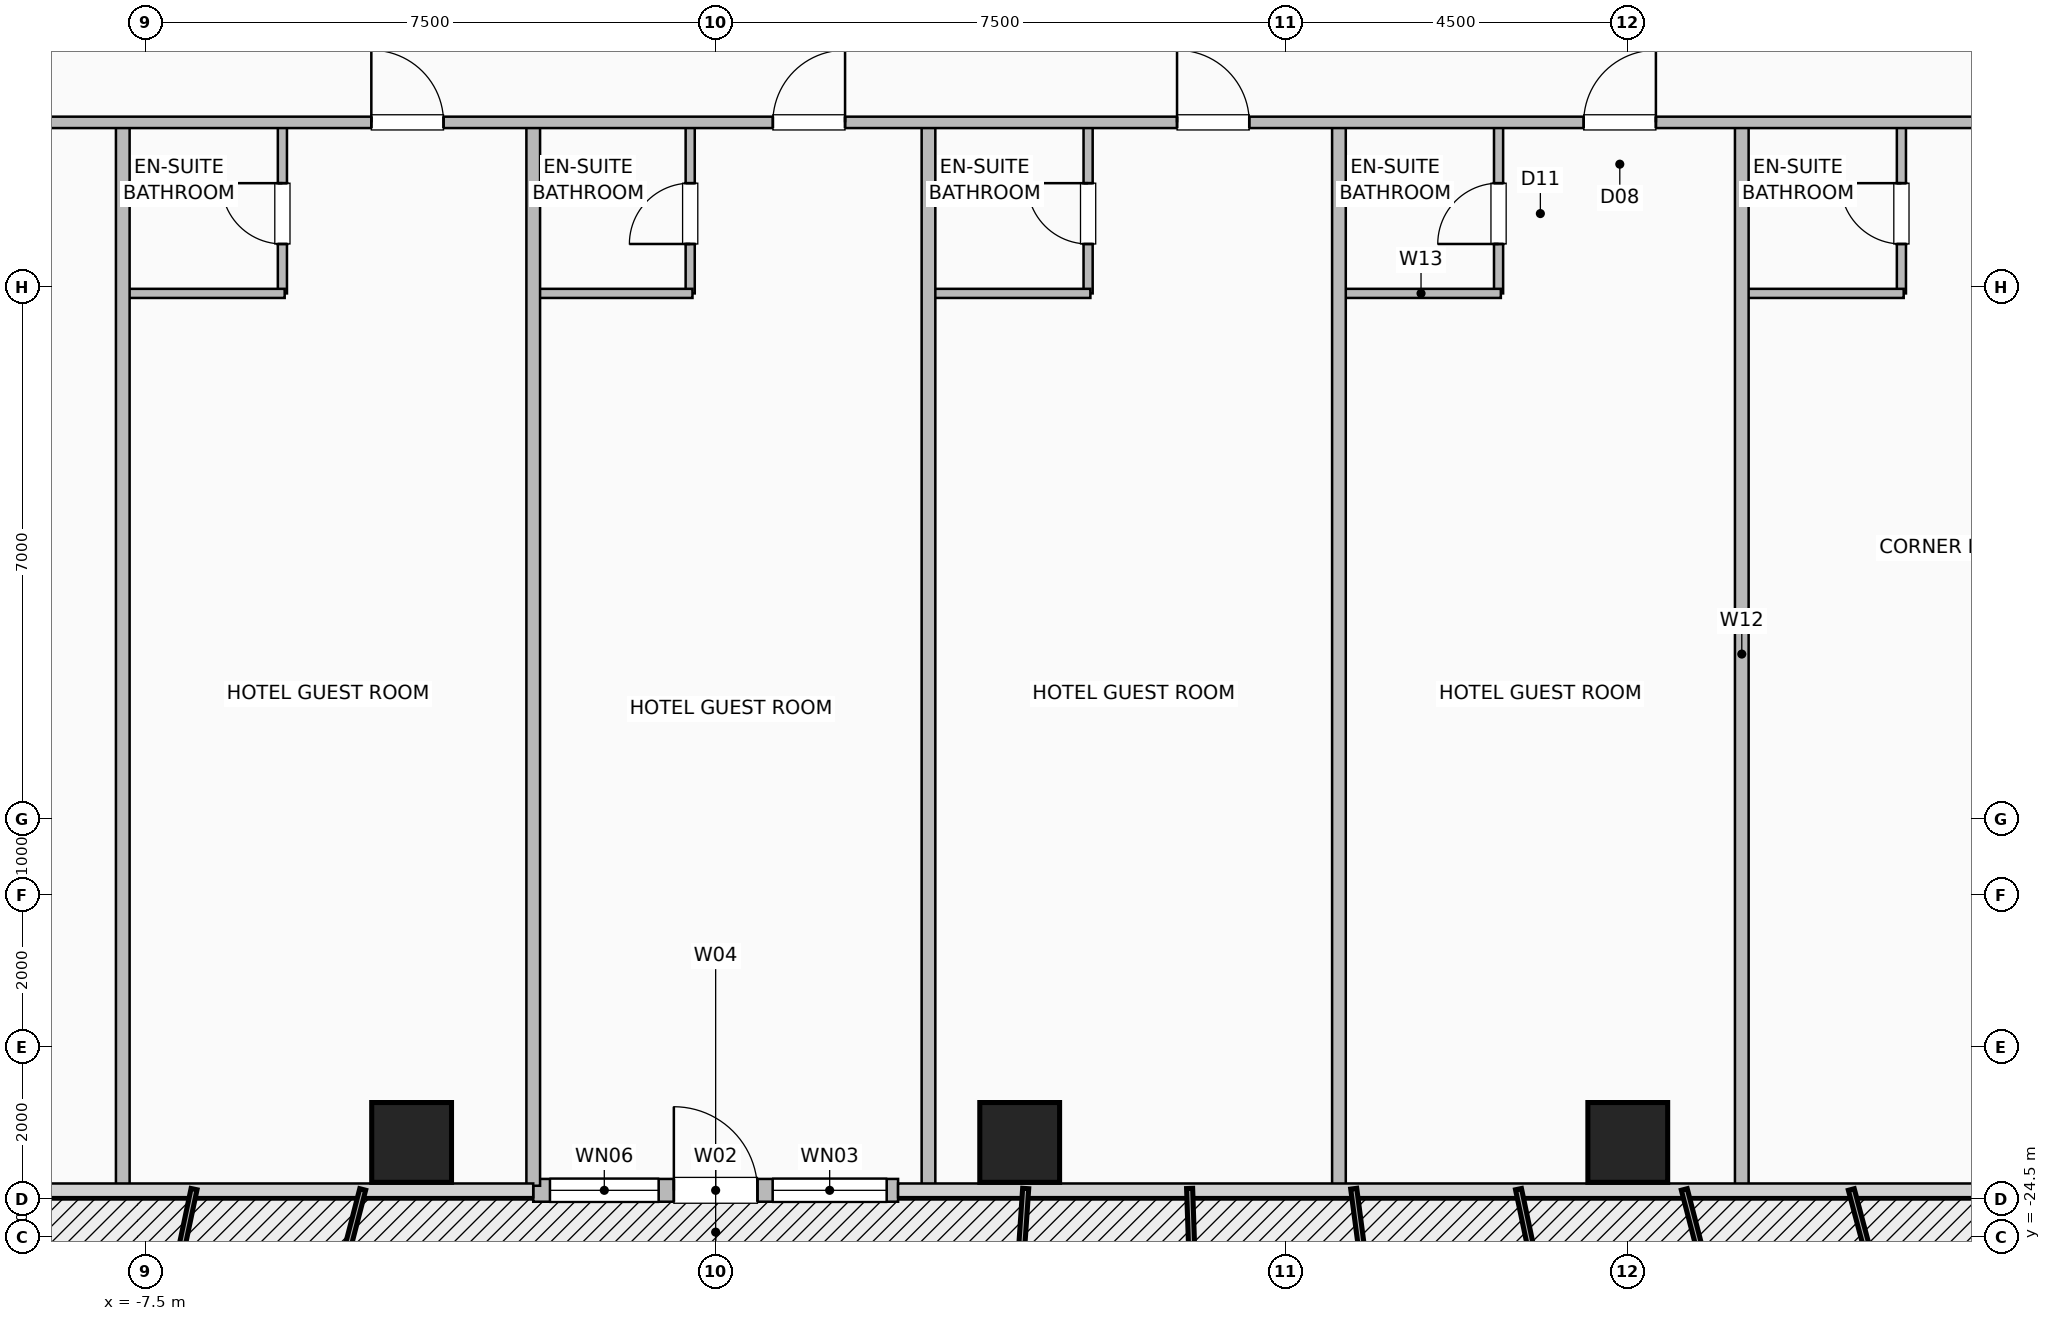
"""IFC4 building model, lengths in metres.
Left out: names, types, materials, properties, quantities, classifications, styles, units other than length and angle.
Written with IfcOpenShell. Run it as: python <this file> out.ifc"""

import sys

from ifc_helpers import new_model, si_unit, direction, frame, frame_2d, origin, origin_2d, place, context, subcontext, project, spatial, rectangle, hollow_rectangle, extrude, element, fill, save


model = new_model("IFC4")
c1 = context("Model", 3, precision=1e-05, world=origin(), true_north=direction((0.0, 1.0)))
c2 = subcontext(c1, "Body", "Model", "MODEL_VIEW")
j1 = project(units=[si_unit("LENGTHUNIT", "METRE"), si_unit("PLANEANGLEUNIT", "RADIAN")], contexts=[c1])
p1 = place(None, origin())
s1 = spatial("IfcSite", under=j1, at=p1, CompositionType="ELEMENT")
p2 = place(p1, origin())
s2 = spatial("IfcBuilding", under=s1, at=p2, CompositionType="ELEMENT")
p3 = place(p2, frame((0.0, 0.0, 27.0)))
s3 = spatial("IfcBuildingStorey", under=s2, at=p3, CompositionType="ELEMENT", Elevation=27.0)
for number, where, z_axis, x_axis in (
    (1, (-4.0, -23.25, 0.0), (0.0, 0.0, 1.0), (1.0, 0.0, 0.0)),
    (2, (4.0, -23.25, 0.0), (0.0, 0.0, 1.0), (1.0, 0.0, 0.0)),
):
    element("IfcColumn", number, at=place(p3, frame(where, z_axis=z_axis, x_axis=x_axis)), inside=s3, PredefinedType="COLUMN", context=c2, shape_type="SweptSolid", body=[
        extrude(hollow_rectangle(XDim=1.05, YDim=1.05, WallThickness=0.05, at=origin_2d()), origin(), (0.0, 0.0, 1.0), 3.5),
    ])
p4 = place(p3, frame((12.0, -23.25, -0.4), z_axis=(0.0, 0.0, 1.0), x_axis=(1.0, 0.0, 0.0)))
e3 = element("IfcColumn", 3, at=p4, inside=s3, PredefinedType="COLUMN", context=c2, shape_type="SweptSolid", body=[
    extrude(hollow_rectangle(XDim=1.05, YDim=1.05, WallThickness=0.05, at=origin_2d()), origin(), (0.0, 0.0, 1.0), 3.9),
])
p5 = place(p3, frame((-2.4, -23.88, 0.0), z_axis=(0.0, 0.0, 1.0), x_axis=(1.0, 0.0, 0.0)))
e4 = element("IfcWall", 4, at=p5, inside=s3, PredefinedType="SOLIDWALL", context=c2, shape_type="SweptSolid", body=[
    extrude(rectangle(XDim=4.8, YDim=0.3, at=frame_2d((2.4, 0.0))), origin(), (0.0, 0.0, 1.0), 3.25),
])
p6 = place(p5, frame((1.85, 0.0, 0.0)))
e5 = element("IfcOpeningElement", 5, at=p6, cuts=e4, PredefinedType="OPENING", context=c2, shape_type="SweptSolid", body=[
    extrude(rectangle(XDim=1.1, YDim=2.2, at=frame_2d((0.55, 1.1))), frame((0.0, 0.16, 0.0), z_axis=(0.0, -1.0, 0.0), x_axis=(1.0, 0.0, 0.0)), (0.0, 0.0, 1.0), 0.32),
])
p7 = place(p5, frame((0.22, 0.0, 0.85)))
e6 = element("IfcOpeningElement", 6, at=p7, cuts=e4, PredefinedType="OPENING", context=c2, shape_type="SweptSolid", body=[
    extrude(rectangle(XDim=1.43, YDim=1.8, at=frame_2d((0.715, 0.9))), frame((0.0, 0.16, 0.0), z_axis=(0.0, -1.0, 0.0), x_axis=(1.0, 0.0, 0.0)), (0.0, 0.0, 1.0), 0.32),
])
p8 = place(p5, frame((3.15, 0.0, 0.85)))
e7 = element("IfcOpeningElement", 7, at=p8, cuts=e4, PredefinedType="OPENING", context=c2, shape_type="SweptSolid", body=[
    extrude(rectangle(XDim=1.5, YDim=1.8, at=frame_2d((0.75, 0.9))), frame((0.0, 0.16, 0.0), z_axis=(0.0, -1.0, 0.0), x_axis=(1.0, 0.0, 0.0)), (0.0, 0.0, 1.0), 0.32),
])
p9 = place(p3, frame((-5.7, -12.08, 0.0), z_axis=(0.0, 0.0, 1.0), x_axis=(0.0, 1.0, 0.0)))
e8 = element("IfcWall", 8, at=p9, inside=s3, PredefinedType="PLUMBINGWALL", context=c2, shape_type="SweptSolid", body=[
    extrude(rectangle(XDim=2.25, YDim=0.12, at=frame_2d((1.125, 0.0))), origin(), (0.0, 0.0, 1.0), 3.25),
])
p10 = place(p9, frame((0.65, 0.0, 0.0)))
e9 = element("IfcOpeningElement", 9, at=p10, cuts=e8, PredefinedType="OPENING", context=c2, shape_type="SweptSolid", body=[
    extrude(rectangle(XDim=0.8, YDim=2.05, at=frame_2d((0.4, 1.025))), frame((0.0, 0.07, 0.0), z_axis=(0.0, -1.0, 0.0), x_axis=(1.0, 0.0, 0.0)), (0.0, 0.0, 1.0), 0.14),
])
p11 = place(p3, frame((-7.77, -12.08, 0.0), z_axis=(0.0, 0.0, 1.0), x_axis=(1.0, 0.0, 0.0)))
e10 = element("IfcWall", 10, at=p11, inside=s3, PredefinedType="PLUMBINGWALL", context=c2, shape_type="SweptSolid", body=[
    extrude(rectangle(XDim=2.1, YDim=0.12, at=frame_2d((1.05, 0.0))), origin(), (0.0, 0.0, 1.0), 3.25),
])
p12 = place(p3, frame((-0.335, -12.08, 0.0), z_axis=(0.0, 0.0, 1.0), x_axis=(0.0, 1.0, 0.0)))
e11 = element("IfcWall", 11, at=p12, inside=s3, PredefinedType="PLUMBINGWALL", context=c2, shape_type="SweptSolid", body=[
    extrude(rectangle(XDim=2.25, YDim=0.12, at=frame_2d((1.125, 0.0))), origin(), (0.0, 0.0, 1.0), 3.25),
])
p13 = place(p12, frame((0.65, 0.0, 0.0)))
e12 = element("IfcOpeningElement", 12, at=p13, cuts=e11, PredefinedType="OPENING", context=c2, shape_type="SweptSolid", body=[
    extrude(rectangle(XDim=0.8, YDim=2.05, at=frame_2d((0.4, 1.025))), frame((0.0, 0.07, 0.0), z_axis=(0.0, -1.0, 0.0), x_axis=(1.0, 0.0, 0.0)), (0.0, 0.0, 1.0), 0.14),
])
p14 = place(p3, frame((-2.37, -12.08, 0.0), z_axis=(0.0, 0.0, 1.0), x_axis=(1.0, 0.0, 0.0)))
e13 = element("IfcWall", 13, at=p14, inside=s3, PredefinedType="PLUMBINGWALL", context=c2, shape_type="SweptSolid", body=[
    extrude(rectangle(XDim=2.065, YDim=0.12, at=frame_2d((1.033, 0.0))), origin(), (0.0, 0.0, 1.0), 3.25),
])
p15 = place(p3, frame((4.9, -12.08, 0.0), z_axis=(0.0, 0.0, 1.0), x_axis=(0.0, 1.0, 0.0)))
e14 = element("IfcWall", 14, at=p15, inside=s3, PredefinedType="PLUMBINGWALL", context=c2, shape_type="SweptSolid", body=[
    extrude(rectangle(XDim=2.25, YDim=0.12, at=frame_2d((1.125, 0.0))), origin(), (0.0, 0.0, 1.0), 2.818),
])
p16 = place(p15, frame((0.65, 0.0, 0.0)))
e15 = element("IfcOpeningElement", 15, at=p16, cuts=e14, PredefinedType="OPENING", context=c2, shape_type="SweptSolid", body=[
    extrude(rectangle(XDim=0.8, YDim=2.05, at=frame_2d((0.4, 1.025))), frame((0.0, 0.07, 0.0), z_axis=(0.0, -1.0, 0.0), x_axis=(1.0, 0.0, 0.0)), (0.0, 0.0, 1.0), 0.14),
])
p17 = place(p3, frame((2.83, -12.08, 0.0), z_axis=(0.0, 0.0, 1.0), x_axis=(1.0, 0.0, 0.0)))
e16 = element("IfcWall", 16, at=p17, inside=s3, PredefinedType="PLUMBINGWALL", context=c2, shape_type="SweptSolid", body=[
    extrude(rectangle(XDim=2.1, YDim=0.12, at=frame_2d((1.05, 0.0))), origin(), (0.0, 0.0, 1.0), 3.25),
])
p18 = place(p3, frame((10.3, -12.08, 0.0), z_axis=(0.0, 0.0, 1.0), x_axis=(0.0, 1.0, 0.0)))
e17 = element("IfcWall", 17, at=p18, inside=s3, PredefinedType="PLUMBINGWALL", context=c2, shape_type="SweptSolid", body=[
    extrude(rectangle(XDim=2.25, YDim=0.12, at=frame_2d((1.125, 0.0))), origin(), (0.0, 0.0, 1.0), 3.25),
])
p19 = place(p18, frame((0.65, 0.0, 0.0)))
e18 = element("IfcOpeningElement", 18, at=p19, cuts=e17, PredefinedType="OPENING", context=c2, shape_type="SweptSolid", body=[
    extrude(rectangle(XDim=0.8, YDim=2.05, at=frame_2d((0.4, 1.025))), frame((0.0, 0.07, 0.0), z_axis=(0.0, -1.0, 0.0), x_axis=(1.0, 0.0, 0.0)), (0.0, 0.0, 1.0), 0.14),
])
p20 = place(p3, frame((8.23, -12.08, 0.0), z_axis=(0.0, 0.0, 1.0), x_axis=(1.0, 0.0, 0.0)))
e19 = element("IfcWall", 19, at=p20, inside=s3, PredefinedType="PLUMBINGWALL", context=c2, shape_type="SweptSolid", body=[
    extrude(rectangle(XDim=2.1, YDim=0.12, at=frame_2d((1.05, 0.0))), origin(), (0.0, 0.0, 1.0), 3.25),
])
p21 = place(p3, frame((15.6, -12.08, 0.0), z_axis=(0.0, 0.0, 1.0), x_axis=(0.0, 1.0, 0.0)))
e20 = element("IfcWall", 20, at=p21, inside=s3, PredefinedType="PLUMBINGWALL", context=c2, shape_type="SweptSolid", body=[
    extrude(rectangle(XDim=2.25, YDim=0.12, at=frame_2d((1.125, 0.0))), origin(), (0.0, 0.0, 1.0), 3.25),
])
p22 = place(p21, frame((0.65, 0.0, 0.0)))
e21 = element("IfcOpeningElement", 21, at=p22, cuts=e20, PredefinedType="OPENING", context=c2, shape_type="SweptSolid", body=[
    extrude(rectangle(XDim=0.8, YDim=2.05, at=frame_2d((0.4, 1.025))), frame((0.0, 0.07, 0.0), z_axis=(0.0, -1.0, 0.0), x_axis=(1.0, 0.0, 0.0)), (0.0, 0.0, 1.0), 0.14),
])
p23 = place(p3, frame((13.53, -12.08, 0.0), z_axis=(0.0, 0.0, 1.0), x_axis=(1.0, 0.0, 0.0)))
e22 = element("IfcWall", 22, at=p23, inside=s3, PredefinedType="PLUMBINGWALL", context=c2, shape_type="SweptSolid", body=[
    extrude(rectangle(XDim=2.1, YDim=0.12, at=frame_2d((1.05, 0.0))), origin(), (0.0, 0.0, 1.0), 3.25),
])
for number, where, z_axis, x_axis in (
    (23, (-7.8, -23.82, 0.0), (0.0, 0.0, 1.0), (0.0, 1.0, 0.0)),
    (24, (-2.4, -23.82, 0.0), (0.0, 0.0, 1.0), (0.0, 1.0, 0.0)),
    (25, (2.8, -23.82, 0.0), (0.0, 0.0, 1.0), (0.0, 1.0, 0.0)),
    (26, (8.2, -23.82, 0.0), (0.0, 0.0, 1.0), (0.0, 1.0, 0.0)),
    (27, (13.5, -23.82, 0.0), (0.0, 0.0, 1.0), (0.0, 1.0, 0.0)),
):
    element("IfcWall", number, at=place(p3, frame(where, z_axis=z_axis, x_axis=x_axis)), inside=s3, PredefinedType="PARTITIONING", context=c2, shape_type="SweptSolid", body=[
        extrude(rectangle(XDim=13.99, YDim=0.18, at=frame_2d((6.995, 0.0))), origin(), (0.0, 0.0, 1.0), 3.25),
    ])
p24 = place(p3, frame((-19.95, -9.83, 0.0), z_axis=(0.0, 0.0, 1.0), x_axis=(1.0, 0.0, 0.0)))
e28 = element("IfcWall", 28, at=p24, inside=s3, PredefinedType="PARTITIONING", context=c2, shape_type="SweptSolid", body=[
    extrude(rectangle(XDim=39.9, YDim=0.15, at=frame_2d((19.95, 0.0))), origin(), (0.0, 0.0, 1.0), 3.25),
])
p25 = place(p24, frame((3.945, 0.0, 0.0)))
e29 = element("IfcOpeningElement", 29, at=p25, cuts=e28, PredefinedType="OPENING", context=c2, shape_type="SweptSolid", body=[
    extrude(rectangle(XDim=0.95, YDim=2.08, at=frame_2d((0.475, 1.04))), frame((0.0, 0.085, 0.0), z_axis=(0.0, -1.0, 0.0), x_axis=(1.0, 0.0, 0.0)), (0.0, 0.0, 1.0), 0.17),
])
p26 = place(p24, frame((10.02, 0.0, 0.0)))
e30 = element("IfcOpeningElement", 30, at=p26, cuts=e28, PredefinedType="OPENING", context=c2, shape_type="SweptSolid", body=[
    extrude(rectangle(XDim=0.95, YDim=2.08, at=frame_2d((0.475, 1.04))), frame((0.0, 0.085, 0.0), z_axis=(0.0, -1.0, 0.0), x_axis=(1.0, 0.0, 0.0)), (0.0, 0.0, 1.0), 0.17),
])
p27 = place(p24, frame((15.42, 0.0, 0.0)))
e31 = element("IfcOpeningElement", 31, at=p27, cuts=e28, PredefinedType="OPENING", context=c2, shape_type="SweptSolid", body=[
    extrude(rectangle(XDim=0.95, YDim=2.08, at=frame_2d((0.475, 1.04))), frame((0.0, 0.085, 0.0), z_axis=(0.0, -1.0, 0.0), x_axis=(1.0, 0.0, 0.0)), (0.0, 0.0, 1.0), 0.17),
])
p28 = place(p24, frame((20.702, 0.0, 0.0)))
e32 = element("IfcOpeningElement", 32, at=p28, cuts=e28, PredefinedType="OPENING", context=c2, shape_type="SweptSolid", body=[
    extrude(rectangle(XDim=0.95, YDim=2.08, at=frame_2d((0.475, 1.04))), frame((0.0, 0.085, 0.0), z_axis=(0.0, -1.0, 0.0), x_axis=(1.0, 0.0, 0.0)), (0.0, 0.0, 1.0), 0.17),
])
p29 = place(p24, frame((26.02, 0.0, 0.0)))
e33 = element("IfcOpeningElement", 33, at=p29, cuts=e28, PredefinedType="OPENING", context=c2, shape_type="SweptSolid", body=[
    extrude(rectangle(XDim=0.95, YDim=2.08, at=frame_2d((0.475, 1.04))), frame((0.0, 0.085, 0.0), z_axis=(0.0, -1.0, 0.0), x_axis=(1.0, 0.0, 0.0)), (0.0, 0.0, 1.0), 0.17),
])
p30 = place(p24, frame((31.37, 0.0, 0.0)))
e34 = element("IfcOpeningElement", 34, at=p30, cuts=e28, PredefinedType="OPENING", context=c2, shape_type="SweptSolid", body=[
    extrude(rectangle(XDim=0.95, YDim=2.08, at=frame_2d((0.475, 1.04))), frame((0.0, 0.085, 0.0), z_axis=(0.0, -1.0, 0.0), x_axis=(1.0, 0.0, 0.0)), (0.0, 0.0, 1.0), 0.17),
])
p31 = place(p24, frame((37.245, 0.0, 0.0)))
e35 = element("IfcOpeningElement", 35, at=p31, cuts=e28, PredefinedType="OPENING", context=c2, shape_type="SweptSolid", body=[
    extrude(rectangle(XDim=0.95, YDim=2.08, at=frame_2d((0.475, 1.04))), frame((0.0, 0.085, 0.0), z_axis=(0.0, -1.0, 0.0), x_axis=(1.0, 0.0, 0.0)), (0.0, 0.0, 1.0), 0.17),
])
p32 = place(p6, origin())
e36 = element("IfcDoor", 36, at=p32, inside=s3, OperationType="SINGLE_SWING_LEFT", PredefinedType="DOOR", context=c2, shape_type="SweptSolid", body=[
    extrude(rectangle(XDim=1.1, YDim=2.2, at=frame_2d((0.55, 1.1))), frame((0.0, 0.025, 0.0), z_axis=(0.0, -1.0, 0.0), x_axis=(1.0, 0.0, 0.0)), (0.0, 0.0, 1.0), 0.05),
])
fill(e5, e36)
p33 = place(p7, origin())
e37 = element("IfcWindow", 37, at=p33, inside=s3, PartitioningType="SINGLE_PANEL", PredefinedType="WINDOW", context=c2, shape_type="SweptSolid", body=[
    extrude(rectangle(XDim=1.43, YDim=1.8, at=frame_2d((0.715, 0.9))), frame((0.0, 0.03, 0.0), z_axis=(0.0, -1.0, 0.0), x_axis=(1.0, 0.0, 0.0)), (0.0, 0.0, 1.0), 0.06),
])
fill(e6, e37)
p34 = place(p8, origin())
e38 = element("IfcWindow", 38, at=p34, inside=s3, PartitioningType="SINGLE_PANEL", PredefinedType="WINDOW", context=c2, shape_type="SweptSolid", body=[
    extrude(rectangle(XDim=1.5, YDim=1.8, at=frame_2d((0.75, 0.9))), frame((0.0, 0.03, 0.0), z_axis=(0.0, -1.0, 0.0), x_axis=(1.0, 0.0, 0.0)), (0.0, 0.0, 1.0), 0.06),
])
fill(e7, e38)
p35 = place(p10, origin())
e39 = element("IfcDoor", 39, at=p35, inside=s3, OperationType="SINGLE_SWING_RIGHT", PredefinedType="DOOR", context=c2, shape_type="SweptSolid", body=[
    extrude(rectangle(XDim=0.8, YDim=2.05, at=frame_2d((0.4, 1.025))), frame((0.0, 0.025, 0.0), z_axis=(0.0, -1.0, 0.0), x_axis=(1.0, 0.0, 0.0)), (0.0, 0.0, 1.0), 0.05),
])
fill(e9, e39)
p36 = place(p13, origin())
e40 = element("IfcDoor", 40, at=p36, inside=s3, OperationType="SINGLE_SWING_LEFT", PredefinedType="DOOR", context=c2, shape_type="SweptSolid", body=[
    extrude(rectangle(XDim=0.8, YDim=2.05, at=frame_2d((0.4, 1.025))), frame((0.0, 0.025, 0.0), z_axis=(0.0, -1.0, 0.0), x_axis=(1.0, 0.0, 0.0)), (0.0, 0.0, 1.0), 0.05),
])
fill(e12, e40)
p37 = place(p16, origin())
e41 = element("IfcDoor", 41, at=p37, inside=s3, OperationType="SINGLE_SWING_RIGHT", PredefinedType="DOOR", context=c2, shape_type="SweptSolid", body=[
    extrude(rectangle(XDim=0.8, YDim=2.05, at=frame_2d((0.4, 1.025))), frame((0.0, 0.025, 0.0), z_axis=(0.0, -1.0, 0.0), x_axis=(1.0, 0.0, 0.0)), (0.0, 0.0, 1.0), 0.05),
])
fill(e15, e41)
p38 = place(p19, origin())
e42 = element("IfcDoor", 42, at=p38, inside=s3, OperationType="SINGLE_SWING_LEFT", PredefinedType="DOOR", context=c2, shape_type="SweptSolid", body=[
    extrude(rectangle(XDim=0.8, YDim=2.05, at=frame_2d((0.4, 1.025))), frame((0.0, 0.025, 0.0), z_axis=(0.0, -1.0, 0.0), x_axis=(1.0, 0.0, 0.0)), (0.0, 0.0, 1.0), 0.05),
])
fill(e18, e42)
p39 = place(p22, origin())
e43 = element("IfcDoor", 43, at=p39, inside=s3, OperationType="SINGLE_SWING_RIGHT", PredefinedType="DOOR", context=c2, shape_type="SweptSolid", body=[
    extrude(rectangle(XDim=0.8, YDim=2.05, at=frame_2d((0.4, 1.025))), frame((0.0, 0.025, 0.0), z_axis=(0.0, -1.0, 0.0), x_axis=(1.0, 0.0, 0.0)), (0.0, 0.0, 1.0), 0.05),
])
fill(e21, e43)
p40 = place(p27, origin())
e44 = element("IfcDoor", 44, at=p40, inside=s3, OperationType="SINGLE_SWING_LEFT", PredefinedType="DOOR", context=c2, shape_type="SweptSolid", body=[
    extrude(rectangle(XDim=0.95, YDim=2.08, at=frame_2d((0.475, 1.04))), frame((0.0, 0.025, 0.0), z_axis=(0.0, -1.0, 0.0), x_axis=(1.0, 0.0, 0.0)), (0.0, 0.0, 1.0), 0.05),
])
fill(e31, e44)
p41 = place(p28, origin())
e45 = element("IfcDoor", 45, at=p41, inside=s3, OperationType="SINGLE_SWING_RIGHT", PredefinedType="DOOR", context=c2, shape_type="SweptSolid", body=[
    extrude(rectangle(XDim=0.95, YDim=2.08, at=frame_2d((0.475, 1.04))), frame((0.0, 0.025, 0.0), z_axis=(0.0, -1.0, 0.0), x_axis=(1.0, 0.0, 0.0)), (0.0, 0.0, 1.0), 0.05),
])
fill(e32, e45)
p42 = place(p29, origin())
e46 = element("IfcDoor", 46, at=p42, inside=s3, OperationType="SINGLE_SWING_LEFT", PredefinedType="DOOR", context=c2, shape_type="SweptSolid", body=[
    extrude(rectangle(XDim=0.95, YDim=2.08, at=frame_2d((0.475, 1.04))), frame((0.0, 0.025, 0.0), z_axis=(0.0, -1.0, 0.0), x_axis=(1.0, 0.0, 0.0)), (0.0, 0.0, 1.0), 0.05),
])
fill(e33, e46)
p43 = place(p30, origin())
e47 = element("IfcDoor", 47, at=p43, inside=s3, OperationType="SINGLE_SWING_RIGHT", PredefinedType="DOOR", context=c2, shape_type="SweptSolid", body=[
    extrude(rectangle(XDim=0.95, YDim=2.08, at=frame_2d((0.475, 1.04))), frame((0.0, 0.025, 0.0), z_axis=(0.0, -1.0, 0.0), x_axis=(1.0, 0.0, 0.0)), (0.0, 0.0, 1.0), 0.05),
])
fill(e34, e47)
save(model, sys.argv[1])
